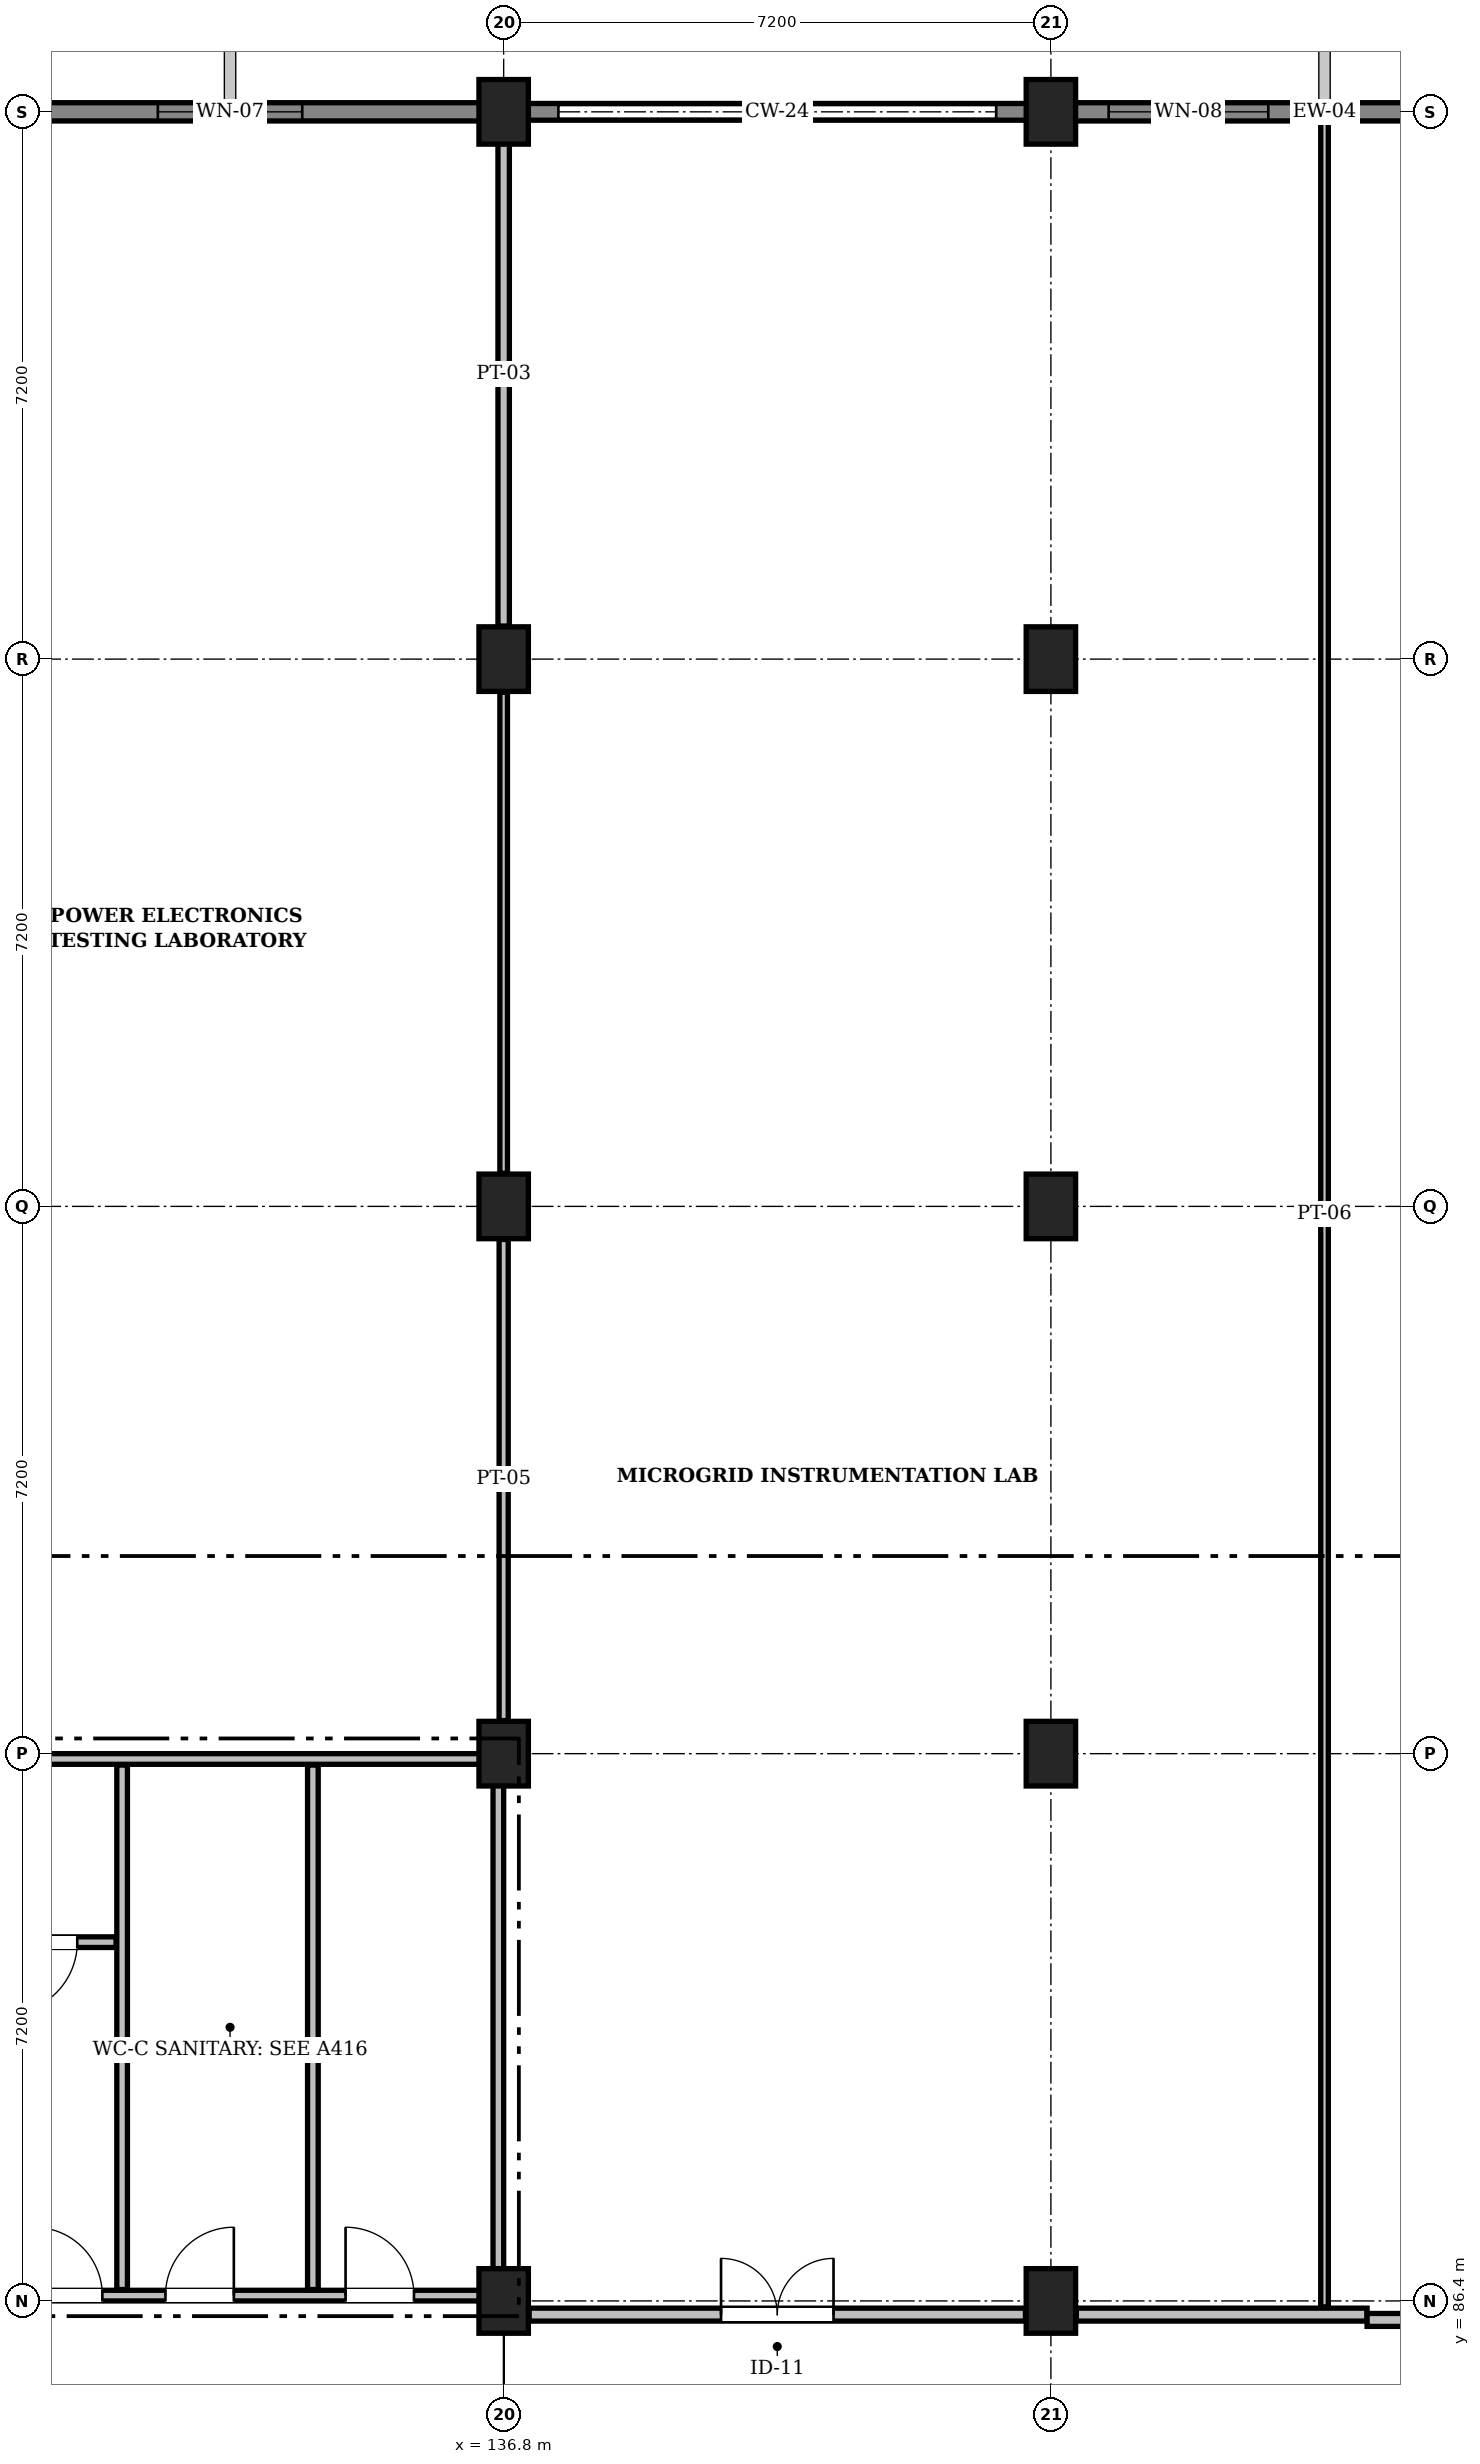
"""IFC4 building model, lengths in metres.
Left out: names, types, materials, properties, quantities, classifications, styles, units other than length and angle.
Written with IfcOpenShell. Run it as: python <this file> out.ifc"""

import sys

from ifc_helpers import new_model, si_unit, direction, frame, frame_2d, origin, origin_2d, place, context, subcontext, project, spatial, rectangle, extrude, element, fill, save


model = new_model("IFC4")
c1 = context("Model", 3, precision=1e-05, world=origin(), true_north=direction((0.0, 1.0)))
c2 = subcontext(c1, "Body", "Model", "MODEL_VIEW")
j1 = project(units=[si_unit("LENGTHUNIT", "METRE"), si_unit("PLANEANGLEUNIT", "RADIAN")], contexts=[c1])
p1 = place(None, origin())
s1 = spatial("IfcSite", under=j1, at=p1, CompositionType="ELEMENT")
p2 = place(p1, origin())
s2 = spatial("IfcBuilding", under=s1, at=p2, CompositionType="ELEMENT")
p3 = place(p2, frame((0.0, 0.0, 9.6)))
s3 = spatial("IfcBuildingStorey", under=s2, at=p3, CompositionType="ELEMENT", Elevation=9.6)
for number, where, z_axis, x_axis in (
    (1, (136.8, 86.4, 0.0), (0.0, 0.0, 1.0), (1.0, 0.0, 0.0)),
    (2, (136.8, 93.6, 0.0), (0.0, 0.0, 1.0), (1.0, 0.0, 0.0)),
    (3, (136.8, 100.8, 0.0), (0.0, 0.0, 1.0), (1.0, 0.0, 0.0)),
    (4, (136.8, 108.0, 0.0), (0.0, 0.0, 1.0), (1.0, 0.0, 0.0)),
    (5, (136.8, 115.2, 0.0), (0.0, 0.0, 1.0), (1.0, 0.0, 0.0)),
    (6, (144.0, 86.4, 0.0), (0.0, 0.0, 1.0), (1.0, 0.0, 0.0)),
    (7, (144.0, 93.6, 0.0), (0.0, 0.0, 1.0), (1.0, 0.0, 0.0)),
    (8, (144.0, 100.8, 0.0), (0.0, 0.0, 1.0), (1.0, 0.0, 0.0)),
    (9, (144.0, 108.0, 0.0), (0.0, 0.0, 1.0), (1.0, 0.0, 0.0)),
    (10, (144.0, 115.2, 0.0), (0.0, 0.0, 1.0), (1.0, 0.0, 0.0)),
):
    element("IfcColumn", number, at=place(p3, frame(where, z_axis=z_axis, x_axis=x_axis)), inside=s3, PredefinedType="COLUMN", context=c2, shape_type="SweptSolid", body=[
        extrude(rectangle(XDim=0.65, YDim=0.85, at=origin_2d()), origin(), (0.0, 0.0, 1.0), 4.8),
    ])
p4 = place(p3, frame((129.6, 115.2, 0.0), z_axis=(0.0, 0.0, 1.0), x_axis=(1.0, 0.0, 0.0)))
e11 = element("IfcWall", 11, at=p4, inside=s3, PredefinedType="SOLIDWALL", context=c2, shape_type="SweptSolid", body=[
    extrude(rectangle(XDim=7.2, YDim=0.24, at=frame_2d((3.6, 0.0))), origin(), (0.0, 0.0, 1.0), 4.52),
])
p5 = place(p4, frame((2.65, 0.0, 0.95)))
e12 = element("IfcOpeningElement", 12, at=p5, cuts=e11, PredefinedType="OPENING", context=c2, shape_type="SweptSolid", body=[
    extrude(rectangle(XDim=1.9, YDim=1.3, at=frame_2d((0.95, 0.65))), frame((0.0, 0.132, 0.0), z_axis=(0.0, -1.0, 0.0), x_axis=(1.0, 0.0, 0.0)), (0.0, 0.0, 1.0), 0.264),
])
p6 = place(p3, frame((136.8, 115.2, 0.0), z_axis=(0.0, 0.0, 1.0), x_axis=(1.0, 0.0, 0.0)))
e13 = element("IfcWall", 13, at=p6, inside=s3, PredefinedType="SOLIDWALL", context=c2, shape_type="SweptSolid", body=[
    extrude(rectangle(XDim=7.2, YDim=0.22, at=frame_2d((3.6, 0.0))), origin(), (0.0, 0.0, 1.0), 1.24),
])
p7 = place(p3, frame((144.0, 115.2, 0.0), z_axis=(0.0, 0.0, 1.0), x_axis=(1.0, 0.0, 0.0)))
e14 = element("IfcWall", 14, at=p7, inside=s3, PredefinedType="SOLIDWALL", context=c2, shape_type="SweptSolid", body=[
    extrude(rectangle(XDim=7.2, YDim=0.24, at=frame_2d((3.6, 0.0))), origin(), (0.0, 0.0, 1.0), 4.52),
])
p8 = place(p7, frame((0.76, 0.0, 0.95)))
e15 = element("IfcOpeningElement", 15, at=p8, cuts=e14, PredefinedType="OPENING", context=c2, shape_type="SweptSolid", body=[
    extrude(rectangle(XDim=2.1, YDim=1.3, at=frame_2d((1.05, 0.65))), frame((0.0, 0.132, 0.0), z_axis=(0.0, -1.0, 0.0), x_axis=(1.0, 0.0, 0.0)), (0.0, 0.0, 1.0), 0.264),
])
p9 = place(p3, frame((129.67, 86.47, 0.0), z_axis=(0.0, 0.0, 1.0), x_axis=(1.0, 0.0, 0.0)))
e16 = element("IfcWall", 16, at=p9, inside=s3, PredefinedType="PARTITIONING", context=c2, shape_type="SweptSolid", body=[
    extrude(rectangle(XDim=7.06, YDim=0.14, at=frame_2d((3.53, 0.0))), origin(), (0.0, 0.0, 1.0), 3.8),
])
p10 = place(p9, frame((0.95, 0.0, 0.0)))
e17 = element("IfcOpeningElement", 17, at=p10, cuts=e16, PredefinedType="OPENING", context=c2, shape_type="SweptSolid", body=[
    extrude(rectangle(XDim=0.9, YDim=2.08, at=frame_2d((0.45, 1.04))), frame((0.0, 0.082, 0.0), z_axis=(0.0, -1.0, 0.0), x_axis=(1.0, 0.0, 0.0)), (0.0, 0.0, 1.0), 0.164),
])
p11 = place(p9, frame((2.68, 0.0, 0.0)))
e18 = element("IfcOpeningElement", 18, at=p11, cuts=e16, PredefinedType="OPENING", context=c2, shape_type="SweptSolid", body=[
    extrude(rectangle(XDim=0.9, YDim=2.08, at=frame_2d((0.45, 1.04))), frame((0.0, 0.082, 0.0), z_axis=(0.0, -1.0, 0.0), x_axis=(1.0, 0.0, 0.0)), (0.0, 0.0, 1.0), 0.164),
])
p12 = place(p9, frame((5.05, 0.0, 0.0)))
e19 = element("IfcOpeningElement", 19, at=p12, cuts=e16, PredefinedType="OPENING", context=c2, shape_type="SweptSolid", body=[
    extrude(rectangle(XDim=0.9, YDim=2.08, at=frame_2d((0.45, 1.04))), frame((0.0, 0.082, 0.0), z_axis=(0.0, -1.0, 0.0), x_axis=(1.0, 0.0, 0.0)), (0.0, 0.0, 1.0), 0.164),
])
p13 = place(p3, frame((129.67, 93.53, 0.0), z_axis=(0.0, 0.0, 1.0), x_axis=(1.0, 0.0, 0.0)))
e20 = element("IfcWall", 20, at=p13, inside=s3, PredefinedType="PARTITIONING", context=c2, shape_type="SweptSolid", body=[
    extrude(rectangle(XDim=7.06, YDim=0.14, at=frame_2d((3.53, 0.0))), origin(), (0.0, 0.0, 1.0), 3.8),
])
p14 = place(p3, frame((136.73, 86.55, 0.0), z_axis=(0.0, 0.0, 1.0), x_axis=(0.0, 1.0, 0.0)))
e21 = element("IfcWall", 21, at=p14, inside=s3, PredefinedType="PARTITIONING", context=c2, shape_type="SweptSolid", body=[
    extrude(rectangle(XDim=6.9, YDim=0.14, at=frame_2d((3.45, 0.0))), origin(), (0.0, 0.0, 1.0), 4.03),
])
for number, where, z_axis, x_axis in (
    (22, (131.78, 86.55, 0.0), (0.0, 0.0, 1.0), (0.0, 1.0, 0.0)),
    (23, (134.29, 86.55, 0.0), (0.0, 0.0, 1.0), (0.0, 1.0, 0.0)),
):
    element("IfcWall", number, at=place(p3, frame(where, z_axis=z_axis, x_axis=x_axis)), inside=s3, PredefinedType="PARTITIONING", context=c2, shape_type="SweptSolid", body=[
        extrude(rectangle(XDim=6.9, YDim=0.14, at=frame_2d((3.45, 0.0))), origin(), (0.0, 0.0, 1.0), 4.46),
    ])
p15 = place(p3, frame((129.75, 91.12, 0.0), z_axis=(0.0, 0.0, 1.0), x_axis=(1.0, 0.0, 0.0)))
e24 = element("IfcWall", 24, at=p15, inside=s3, PredefinedType="PARTITIONING", context=c2, shape_type="SweptSolid", body=[
    extrude(rectangle(XDim=1.95, YDim=0.14, at=frame_2d((0.975, 0.0))), origin(), (0.0, 0.0, 1.0), 4.46),
])
p16 = place(p15, frame((0.5, 0.0, 0.0)))
e25 = element("IfcOpeningElement", 25, at=p16, cuts=e24, PredefinedType="OPENING", context=c2, shape_type="SweptSolid", body=[
    extrude(rectangle(XDim=0.94, YDim=2.1, at=frame_2d((0.47, 1.05))), frame((0.0, 0.082, 0.0), z_axis=(0.0, -1.0, 0.0), x_axis=(1.0, 0.0, 0.0)), (0.0, 0.0, 1.0), 0.164),
])
p17 = place(p3, frame((137.135, 86.22, 0.0), z_axis=(0.0, 0.0, 1.0), x_axis=(1.0, 0.0, 0.0)))
e26 = element("IfcWall", 26, at=p17, inside=s3, PredefinedType="PARTITIONING", context=c2, shape_type="SweptSolid", body=[
    extrude(rectangle(XDim=6.53, YDim=0.17, at=frame_2d((3.265, 0.0))), origin(), (0.0, 0.0, 1.0), 3.8),
])
p18 = place(p17, frame((2.525, 0.0, 0.0)))
e27 = element("IfcOpeningElement", 27, at=p18, cuts=e26, PredefinedType="OPENING", context=c2, shape_type="SweptSolid", body=[
    extrude(rectangle(XDim=1.48, YDim=2.26, at=frame_2d((0.74, 1.13))), frame((0.0, 0.097, 0.0), z_axis=(0.0, -1.0, 0.0), x_axis=(1.0, 0.0, 0.0)), (0.0, 0.0, 1.0), 0.194),
])
p19 = place(p3, frame((144.335, 86.22, 0.0), z_axis=(0.0, 0.0, 1.0), x_axis=(1.0, 0.0, 0.0)))
e28 = element("IfcWall", 28, at=p19, inside=s3, PredefinedType="PARTITIONING", context=c2, shape_type="SweptSolid", body=[
    extrude(rectangle(XDim=3.825, YDim=0.17, at=frame_2d((1.913, 0.0))), origin(), (0.0, 0.0, 1.0), 3.8),
])
p20 = place(p3, frame((148.16, 86.15, 0.0), z_axis=(0.0, 0.0, 1.0), x_axis=(1.0, 0.0, 0.0)))
e29 = element("IfcWall", 29, at=p20, inside=s3, PredefinedType="PARTITIONING", context=c2, shape_type="SweptSolid", body=[
    extrude(rectangle(XDim=2.705, YDim=0.17, at=frame_2d((1.353, 0.0))), origin(), (0.0, 0.0, 1.0), 3.8),
])
p21 = place(p3, frame((136.8, 94.035, 0.0), z_axis=(0.0, 0.0, 1.0), x_axis=(0.0, 1.0, 0.0)))
e30 = element("IfcWall", 30, at=p21, inside=s3, PredefinedType="PARTITIONING", context=c2, shape_type="SweptSolid", body=[
    extrude(rectangle(XDim=6.33, YDim=0.12, at=frame_2d((3.165, 0.0))), origin(), (0.0, 0.0, 1.0), 4.03),
])
p22 = place(p3, frame((136.8, 101.235, 0.0), z_axis=(0.0, 0.0, 1.0), x_axis=(0.0, 1.0, 0.0)))
e31 = element("IfcWall", 31, at=p22, inside=s3, PredefinedType="PARTITIONING", context=c2, shape_type="SweptSolid", body=[
    extrude(rectangle(XDim=6.33, YDim=0.1, at=frame_2d((3.165, 0.0))), origin(), (0.0, 0.0, 1.0), 4.03),
])
p23 = place(p3, frame((136.8, 108.435, 0.0), z_axis=(0.0, 0.0, 1.0), x_axis=(0.0, 1.0, 0.0)))
e32 = element("IfcWall", 32, at=p23, inside=s3, PredefinedType="PARTITIONING", context=c2, shape_type="SweptSolid", body=[
    extrude(rectangle(XDim=6.633, YDim=0.15, at=frame_2d((3.316, 0.0))), origin(), (0.0, 0.0, 1.0), 4.03),
])
p24 = place(p3, frame((147.6, 86.32, 0.0), z_axis=(0.0, 0.0, 1.0), x_axis=(0.0, 1.0, 0.0)))
e33 = element("IfcWall", 33, at=p24, inside=s3, PredefinedType="PARTITIONING", context=c2, shape_type="SweptSolid", body=[
    extrude(rectangle(XDim=28.748, YDim=0.1, at=frame_2d((14.374, 0.0))), origin(), (0.0, 0.0, 1.0), 4.46),
])
p25 = place(p5, origin())
e34 = element("IfcWindow", 34, at=p25, inside=s3, PartitioningType="SINGLE_PANEL", PredefinedType="WINDOW", context=c2, shape_type="SweptSolid", body=[
    extrude(rectangle(XDim=1.9, YDim=1.3, at=frame_2d((0.95, 0.65))), frame((0.0, 0.03, 0.0), z_axis=(0.0, -1.0, 0.0), x_axis=(1.0, 0.0, 0.0)), (0.0, 0.0, 1.0), 0.06),
])
fill(e12, e34)
p26 = place(p8, origin())
e35 = element("IfcWindow", 35, at=p26, inside=s3, PartitioningType="SINGLE_PANEL", PredefinedType="WINDOW", context=c2, shape_type="SweptSolid", body=[
    extrude(rectangle(XDim=2.1, YDim=1.3, at=frame_2d((1.05, 0.65))), frame((0.0, 0.03, 0.0), z_axis=(0.0, -1.0, 0.0), x_axis=(1.0, 0.0, 0.0)), (0.0, 0.0, 1.0), 0.06),
])
fill(e15, e35)
p27 = place(p10, origin())
e36 = element("IfcDoor", 36, at=p27, inside=s3, OperationType="SINGLE_SWING_LEFT", PredefinedType="DOOR", context=c2, shape_type="SweptSolid", body=[
    extrude(rectangle(XDim=0.9, YDim=2.08, at=frame_2d((0.45, 1.04))), frame((0.0, 0.025, 0.0), z_axis=(0.0, -1.0, 0.0), x_axis=(1.0, 0.0, 0.0)), (0.0, 0.0, 1.0), 0.05),
])
fill(e17, e36)
p28 = place(p11, origin())
e37 = element("IfcDoor", 37, at=p28, inside=s3, OperationType="SINGLE_SWING_RIGHT", PredefinedType="DOOR", context=c2, shape_type="SweptSolid", body=[
    extrude(rectangle(XDim=0.9, YDim=2.08, at=frame_2d((0.45, 1.04))), frame((0.0, 0.025, 0.0), z_axis=(0.0, -1.0, 0.0), x_axis=(1.0, 0.0, 0.0)), (0.0, 0.0, 1.0), 0.05),
])
fill(e18, e37)
p29 = place(p12, origin())
e38 = element("IfcDoor", 38, at=p29, inside=s3, OperationType="SINGLE_SWING_LEFT", PredefinedType="DOOR", context=c2, shape_type="SweptSolid", body=[
    extrude(rectangle(XDim=0.9, YDim=2.08, at=frame_2d((0.45, 1.04))), frame((0.0, 0.025, 0.0), z_axis=(0.0, -1.0, 0.0), x_axis=(1.0, 0.0, 0.0)), (0.0, 0.0, 1.0), 0.05),
])
fill(e19, e38)
p30 = place(p16, frame((0.94, 0.0, 0.0), z_axis=(0.0, 0.0, 1.0), x_axis=(-1.0, 0.0, 0.0)))
e39 = element("IfcDoor", 39, at=p30, inside=s3, OperationType="SINGLE_SWING_RIGHT", PredefinedType="DOOR", context=c2, shape_type="SweptSolid", body=[
    extrude(rectangle(XDim=0.94, YDim=2.1, at=frame_2d((0.47, 1.05))), frame((0.0, 0.025, 0.0), z_axis=(0.0, -1.0, 0.0), x_axis=(1.0, 0.0, 0.0)), (0.0, 0.0, 1.0), 0.05),
])
fill(e25, e39)
p31 = place(p18, origin())
e40 = element("IfcDoor", 40, at=p31, inside=s3, OperationType="DOUBLE_DOOR_SINGLE_SWING", PredefinedType="DOOR", context=c2, shape_type="SweptSolid", body=[
    extrude(rectangle(XDim=1.48, YDim=2.26, at=frame_2d((0.74, 1.13))), frame((0.0, 0.025, 0.0), z_axis=(0.0, -1.0, 0.0), x_axis=(1.0, 0.0, 0.0)), (0.0, 0.0, 1.0), 0.05),
])
fill(e27, e40)
save(model, sys.argv[1])
